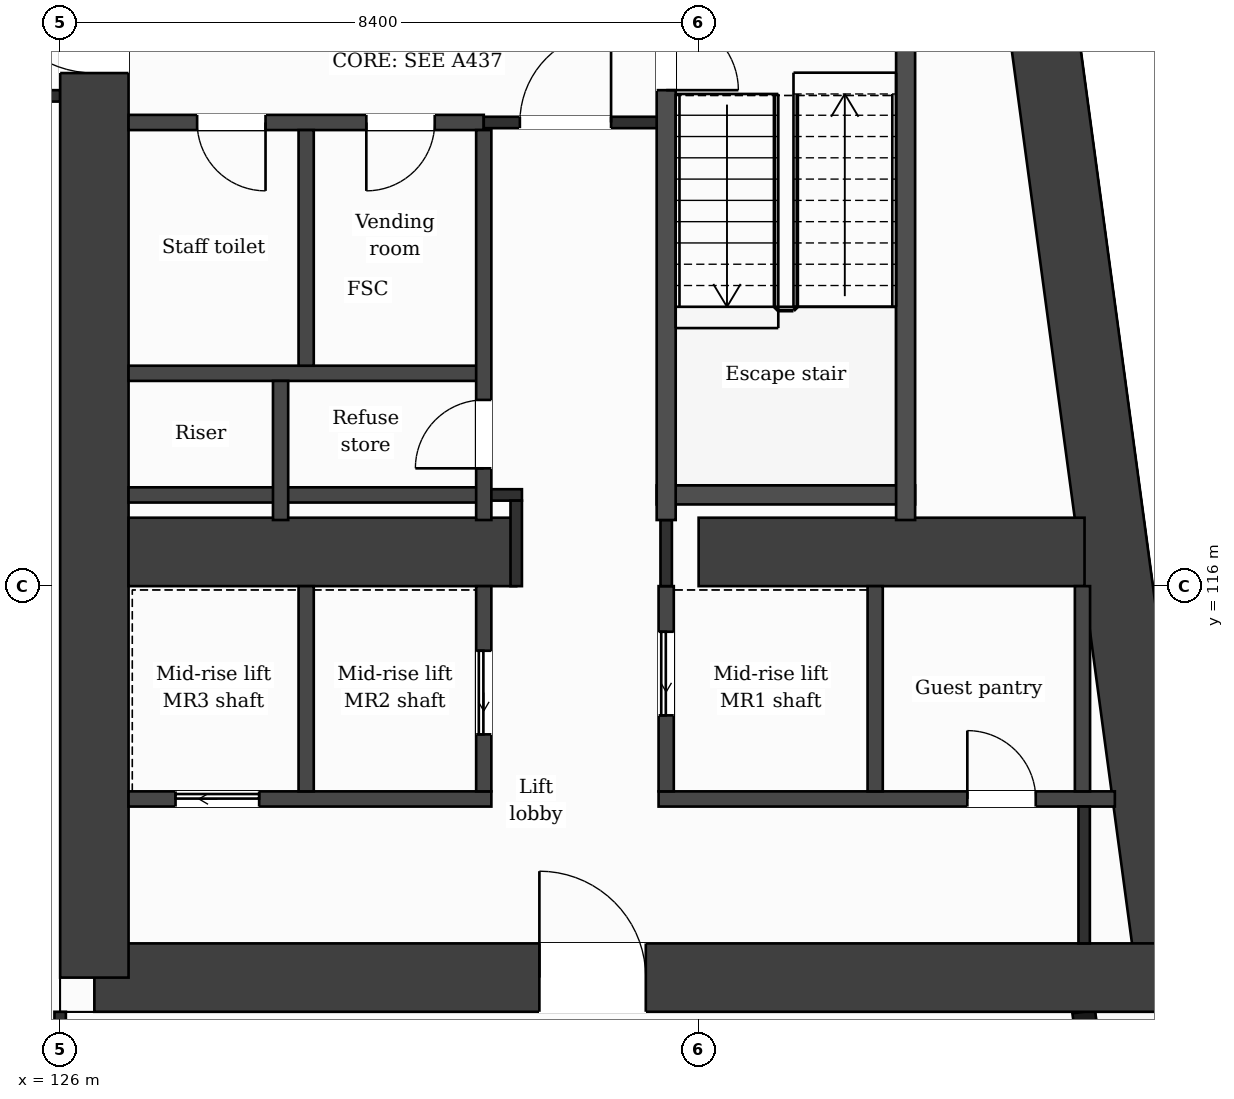
"""IFC4 building model, lengths in metres.
Left out: names, types, materials, properties, quantities, classifications, styles, units other than length and angle.
Written with IfcOpenShell. Run it as: python <this file> out.ifc"""

import sys

from ifc_helpers import new_model, si_unit, direction, frame, frame_2d, origin, place, context, subcontext, project, spatial, rectangle, extrude, element, fill, save


model = new_model("IFC4")
c1 = context("Model", 3, precision=1e-05, world=origin(), true_north=direction((0.0, 1.0)))
c2 = subcontext(c1, "Body", "Model", "MODEL_VIEW")
j1 = project(units=[si_unit("LENGTHUNIT", "METRE"), si_unit("PLANEANGLEUNIT", "RADIAN")], contexts=[c1])
p1 = place(None, origin())
s1 = spatial("IfcSite", under=j1, at=p1, CompositionType="ELEMENT")
p2 = place(p1, origin())
s2 = spatial("IfcBuilding", under=s1, at=p2, CompositionType="ELEMENT")
p3 = place(p2, frame((0.0, 0.0, 155.2)))
s3 = spatial("IfcBuildingStorey", under=s2, at=p3, CompositionType="ELEMENT", Elevation=155.2)
p4 = place(p3, frame((137.776, 131.95, 0.0), z_axis=(0.0, 0.0, 1.0), x_axis=(0.133421759112, -0.991059349482, 0.0)))
e1 = element("IfcWall", 1, at=p4, inside=s3, PredefinedType="SHEAR", context=c2, shape_type="SweptSolid", body=[
    extrude(rectangle(XDim=21.29, YDim=0.9, at=frame_2d((10.645, 0.0))), origin(), (0.0, 0.0, 1.0), 3.7),
])
p5 = place(p3, frame((140.616, 110.85, 0.0), z_axis=(0.0, 0.0, 1.0), x_axis=(-1.0, 0.0, 0.0)))
e2 = element("IfcWall", 2, at=p5, inside=s3, PredefinedType="SHEAR", context=c2, shape_type="SweptSolid", body=[
    extrude(rectangle(XDim=14.166, YDim=0.9, at=frame_2d((7.083, 0.0))), origin(), (0.0, 0.0, 1.0), 3.7),
])
p6 = place(p5, frame((6.911, 0.0, 0.0)))
e3 = element("IfcOpeningElement", 3, at=p6, cuts=e2, PredefinedType="OPENING", context=c2, shape_type="SweptSolid", body=[
    extrude(rectangle(XDim=1.4, YDim=2.1, at=frame_2d((0.7, 1.05))), frame((0.0, 0.46, 0.0), z_axis=(0.0, -1.0, 0.0), x_axis=(1.0, 0.0, 0.0)), (0.0, 0.0, 1.0), 0.92),
])
p7 = place(p3, frame((126.45, 110.85, 0.0), z_axis=(0.0, 0.0, 1.0), x_axis=(0.0, 1.0, 0.0)))
e4 = element("IfcWall", 4, at=p7, inside=s3, PredefinedType="SHEAR", context=c2, shape_type="SweptSolid", body=[
    extrude(rectangle(XDim=21.1, YDim=0.9, at=frame_2d((10.55, 0.0))), origin(), (0.0, 0.0, 1.0), 3.7),
])
p8 = place(p7, frame((11.9, 0.0, 0.0)))
e5 = element("IfcOpeningElement", 5, at=p8, cuts=e4, PredefinedType="OPENING", context=c2, shape_type="SweptSolid", body=[
    extrude(rectangle(XDim=1.4, YDim=2.1, at=frame_2d((0.7, 1.05))), frame((0.0, 0.46, 0.0), z_axis=(0.0, -1.0, 0.0), x_axis=(1.0, 0.0, 0.0)), (0.0, 0.0, 1.0), 0.92),
])
p9 = place(p3, frame((126.9, 116.45, 0.0), z_axis=(0.0, 0.0, 1.0), x_axis=(1.0, 0.0, 0.0)))
e6 = element("IfcWall", 6, at=p9, inside=s3, PredefinedType="SHEAR", context=c2, shape_type="SweptSolid", body=[
    extrude(rectangle(XDim=5.1, YDim=0.9, at=frame_2d((2.55, 0.0))), origin(), (0.0, 0.0, 1.0), 3.7),
])
p10 = place(p3, frame((134.4, 116.45, 0.0), z_axis=(0.0, 0.0, 1.0), x_axis=(1.0, 0.0, 0.0)))
e7 = element("IfcWall", 7, at=p10, inside=s3, PredefinedType="SHEAR", context=c2, shape_type="SweptSolid", body=[
    extrude(rectangle(XDim=5.077, YDim=0.9, at=frame_2d((2.539, 0.0))), origin(), (0.0, 0.0, 1.0), 3.7),
])
p11 = place(p3, frame((140.348, 103.85, 0.0), z_axis=(0.0, 0.0, 1.0), x_axis=(-0.133431549479, 0.991058031401, 0.0)))
e8 = element("IfcWall", 8, at=p11, inside=s3, PredefinedType="SOLIDWALL", context=c2, shape_type="SweptSolid", body=[
    extrude(rectangle(XDim=6.609, YDim=0.3, at=frame_2d((3.304, 0.0))), origin(), (0.0, 0.0, 1.0), 3.38),
])
p12 = place(p11, frame((0.737, 0.0, 0.9)))
e9 = element("IfcOpeningElement", 9, at=p12, cuts=e8, PredefinedType="OPENING", context=c2, shape_type="SweptSolid", body=[
    extrude(rectangle(XDim=1.2, YDim=2.1, at=frame_2d((0.6, 1.05))), frame((0.0, 0.16, 0.0), z_axis=(0.0, -1.0, 0.0), x_axis=(1.0, 0.0, 0.0)), (0.0, 0.0, 1.0), 0.32),
])
p13 = place(p11, frame((3.991, 0.0, 0.0)))
e10 = element("IfcOpeningElement", 10, at=p13, cuts=e8, PredefinedType="OPENING", context=c2, shape_type="SweptSolid", body=[
    extrude(rectangle(XDim=1.2, YDim=2.4, at=frame_2d((0.6, 1.2))), frame((0.0, 0.16, 0.0), z_axis=(0.0, -1.0, 0.0), x_axis=(1.0, 0.0, 0.0)), (0.0, 0.0, 1.0), 0.32),
])
p14 = place(p3, frame((126.9, 113.2, 0.0), z_axis=(0.0, 0.0, 1.0), x_axis=(1.0, 0.0, 0.0)))
e11 = element("IfcWall", 11, at=p14, inside=s3, PredefinedType="PARTITIONING", context=c2, shape_type="SweptSolid", body=[
    extrude(rectangle(XDim=4.773, YDim=0.2, at=frame_2d((2.387, 0.0))), origin(), (0.0, 0.0, 1.0), 3.38),
])
p15 = place(p14, frame((0.618, 0.0, 0.0)))
e12 = element("IfcOpeningElement", 12, at=p15, cuts=e11, PredefinedType="OPENING", context=c2, shape_type="SweptSolid", body=[
    extrude(rectangle(XDim=1.1, YDim=2.1, at=frame_2d((0.55, 1.05))), frame((0.0, 0.11, 0.0), z_axis=(0.0, -1.0, 0.0), x_axis=(1.0, 0.0, 0.0)), (0.0, 0.0, 1.0), 0.22),
])
p16 = place(p3, frame((133.873, 113.2, 0.0), z_axis=(0.0, 0.0, 1.0), x_axis=(1.0, 0.0, 0.0)))
e13 = element("IfcWall", 13, at=p16, inside=s3, PredefinedType="PARTITIONING", context=c2, shape_type="SweptSolid", body=[
    extrude(rectangle(XDim=6.003, YDim=0.2, at=frame_2d((3.001, 0.0))), origin(), (0.0, 0.0, 1.0), 3.38),
])
p17 = place(p16, frame((4.062, 0.0, 0.0)))
e14 = element("IfcOpeningElement", 14, at=p17, cuts=e13, PredefinedType="OPENING", context=c2, shape_type="SweptSolid", body=[
    extrude(rectangle(XDim=0.9, YDim=2.1, at=frame_2d((0.45, 1.05))), frame((0.0, 0.11, 0.0), z_axis=(0.0, -1.0, 0.0), x_axis=(1.0, 0.0, 0.0)), (0.0, 0.0, 1.0), 0.22),
])
p18 = place(p3, frame((126.9, 117.2, 0.0), z_axis=(0.0, 0.0, 1.0), x_axis=(1.0, 0.0, 0.0)))
e15 = element("IfcWall", 15, at=p18, inside=s3, PredefinedType="PARTITIONING", context=c2, shape_type="SweptSolid", body=[
    extrude(rectangle(XDim=4.673, YDim=0.2, at=frame_2d((2.336, 0.0))), origin(), (0.0, 0.0, 1.0), 3.38),
])
p19 = place(p3, frame((131.573, 117.2, 0.0), z_axis=(0.0, 0.0, 1.0), x_axis=(1.0, 0.0, 0.0)))
e16 = element("IfcWall", 16, at=p19, inside=s3, PredefinedType="PARTITIONING", context=c2, shape_type="SweptSolid", body=[
    extrude(rectangle(XDim=0.502, YDim=0.15, at=frame_2d((0.251, 0.0))), origin(), (0.0, 0.0, 1.0), 3.38),
])
p20 = place(p3, frame((133.848, 117.2, 0.0), z_axis=(0.0, 0.0, 1.0), x_axis=(1.0, 0.0, 0.0)))
e17 = element("IfcWall", 17, at=p20, inside=s3, PredefinedType="PARTITIONING", context=c2, shape_type="SweptSolid", body=[
    extrude(rectangle(XDim=3.4, YDim=0.25, at=frame_2d((1.7, 0.0))), origin(), (0.0, 0.0, 1.0), 3.38),
])
p21 = place(p3, frame((126.9, 118.8, 0.0), z_axis=(0.0, 0.0, 1.0), x_axis=(1.0, 0.0, 0.0)))
e18 = element("IfcWall", 18, at=p21, inside=s3, PredefinedType="PARTITIONING", context=c2, shape_type="SweptSolid", body=[
    extrude(rectangle(XDim=4.673, YDim=0.2, at=frame_2d((2.336, 0.0))), origin(), (0.0, 0.0, 1.0), 3.38),
])
p22 = place(p3, frame((126.9, 122.1, 0.0), z_axis=(0.0, 0.0, 1.0), x_axis=(1.0, 0.0, 0.0)))
e19 = element("IfcWall", 19, at=p22, inside=s3, PredefinedType="PARTITIONING", context=c2, shape_type="SweptSolid", body=[
    extrude(rectangle(XDim=4.673, YDim=0.2, at=frame_2d((2.336, 0.0))), origin(), (0.0, 0.0, 1.0), 3.38),
])
p23 = place(p22, frame((3.128, 0.0, 0.0)))
e20 = element("IfcOpeningElement", 20, at=p23, cuts=e19, PredefinedType="OPENING", context=c2, shape_type="SweptSolid", body=[
    extrude(rectangle(XDim=0.9, YDim=2.1, at=frame_2d((0.45, 1.05))), frame((0.0, 0.11, 0.0), z_axis=(0.0, -1.0, 0.0), x_axis=(1.0, 0.0, 0.0)), (0.0, 0.0, 1.0), 0.22),
])
p24 = place(p22, frame((0.902, 0.0, 0.0)))
e21 = element("IfcOpeningElement", 21, at=p24, cuts=e19, PredefinedType="OPENING", context=c2, shape_type="SweptSolid", body=[
    extrude(rectangle(XDim=0.9, YDim=2.1, at=frame_2d((0.45, 1.05))), frame((0.0, 0.11, 0.0), z_axis=(0.0, -1.0, 0.0), x_axis=(1.0, 0.0, 0.0)), (0.0, 0.0, 1.0), 0.22),
])
p25 = place(p3, frame((131.573, 122.1, 0.0), z_axis=(0.0, 0.0, 1.0), x_axis=(1.0, 0.0, 0.0)))
e22 = element("IfcWall", 22, at=p25, inside=s3, PredefinedType="PARTITIONING", context=c2, shape_type="SweptSolid", body=[
    extrude(rectangle(XDim=2.4, YDim=0.15, at=frame_2d((1.2, 0.0))), origin(), (0.0, 0.0, 1.0), 3.38),
])
p26 = place(p25, frame((0.475, 0.0, 0.0)))
e23 = element("IfcOpeningElement", 23, at=p26, cuts=e22, PredefinedType="OPENING", context=c2, shape_type="SweptSolid", body=[
    extrude(rectangle(XDim=1.2, YDim=2.1, at=frame_2d((0.6, 1.05))), frame((0.0, 0.085, 0.0), z_axis=(0.0, -1.0, 0.0), x_axis=(1.0, 0.0, 0.0)), (0.0, 0.0, 1.0), 0.17),
])
p27 = place(p3, frame((100.8, 122.45, 0.0), z_axis=(0.0, 0.0, 1.0), x_axis=(1.0, 0.0, 0.0)))
e24 = element("IfcWall", 24, at=p27, inside=s3, PredefinedType="PARTITIONING", context=c2, shape_type="SweptSolid", body=[
    extrude(rectangle(XDim=25.2, YDim=0.15, at=frame_2d((12.6, 0.0))), origin(), (0.0, 0.0, 1.0), 3.38),
])
p28 = place(p3, frame((126.0, 109.075, 0.0), z_axis=(0.0, 0.0, 1.0), x_axis=(0.0, 1.0, 0.0)))
e25 = element("IfcWall", 25, at=p28, inside=s3, PredefinedType="PARTITIONING", context=c2, shape_type="SweptSolid", body=[
    extrude(rectangle(XDim=1.325, YDim=0.15, at=frame_2d((0.663, 0.0))), origin(), (0.0, 0.0, 1.0), 3.38),
])
p29 = place(p3, frame((128.9, 116.87, 0.0), z_axis=(0.0, 0.0, 1.0), x_axis=(0.0, 1.0, 0.0)))
e26 = element("IfcWall", 26, at=p29, inside=s3, PredefinedType="PARTITIONING", context=c2, shape_type="SweptSolid", body=[
    extrude(rectangle(XDim=1.83, YDim=0.2, at=frame_2d((0.915, 0.0))), origin(), (0.0, 0.0, 1.0), 3.38),
])
p30 = place(p3, frame((129.237, 113.3, 0.0), z_axis=(0.0, 0.0, 1.0), x_axis=(0.0, 1.0, 0.0)))
e27 = element("IfcWall", 27, at=p30, inside=s3, PredefinedType="PARTITIONING", context=c2, shape_type="SweptSolid", body=[
    extrude(rectangle(XDim=2.7, YDim=0.2, at=frame_2d((1.35, 0.0))), origin(), (0.0, 0.0, 1.0), 3.38),
])
p31 = place(p3, frame((129.237, 118.9, 0.0), z_axis=(0.0, 0.0, 1.0), x_axis=(0.0, 1.0, 0.0)))
e28 = element("IfcWall", 28, at=p31, inside=s3, PredefinedType="PARTITIONING", context=c2, shape_type="SweptSolid", body=[
    extrude(rectangle(XDim=3.1, YDim=0.2, at=frame_2d((1.55, 0.0))), origin(), (0.0, 0.0, 1.0), 3.38),
])
p32 = place(p3, frame((131.573, 113.3, 0.0), z_axis=(0.0, 0.0, 1.0), x_axis=(0.0, 1.0, 0.0)))
e29 = element("IfcWall", 29, at=p32, inside=s3, PredefinedType="PARTITIONING", context=c2, shape_type="SweptSolid", body=[
    extrude(rectangle(XDim=2.7, YDim=0.2, at=frame_2d((1.35, 0.0))), origin(), (0.0, 0.0, 1.0), 3.38),
])
p33 = place(p32, frame((0.75, 0.0, 0.0)))
e30 = element("IfcOpeningElement", 30, at=p33, cuts=e29, PredefinedType="OPENING", context=c2, shape_type="SweptSolid", body=[
    extrude(rectangle(XDim=1.1, YDim=2.1, at=frame_2d((0.55, 1.05))), frame((0.0, 0.11, 0.0), z_axis=(0.0, -1.0, 0.0), x_axis=(1.0, 0.0, 0.0)), (0.0, 0.0, 1.0), 0.22),
])
p34 = place(p3, frame((131.573, 116.87, 0.0), z_axis=(0.0, 0.0, 1.0), x_axis=(0.0, 1.0, 0.0)))
e31 = element("IfcWall", 31, at=p34, inside=s3, PredefinedType="PARTITIONING", context=c2, shape_type="SweptSolid", body=[
    extrude(rectangle(XDim=5.13, YDim=0.2, at=frame_2d((2.565, 0.0))), origin(), (0.0, 0.0, 1.0), 3.38),
])
p35 = place(p34, frame((0.68, 0.0, 0.0)))
e32 = element("IfcOpeningElement", 32, at=p35, cuts=e31, PredefinedType="OPENING", context=c2, shape_type="SweptSolid", body=[
    extrude(rectangle(XDim=0.9, YDim=2.1, at=frame_2d((0.45, 1.05))), frame((0.0, 0.11, 0.0), z_axis=(0.0, -1.0, 0.0), x_axis=(1.0, 0.0, 0.0)), (0.0, 0.0, 1.0), 0.22),
])
p36 = place(p3, frame((132.0, 116.0, 0.0), z_axis=(0.0, 0.0, 1.0), x_axis=(0.0, 1.0, 0.0)))
e33 = element("IfcWall", 33, at=p36, inside=s3, PredefinedType="PARTITIONING", context=c2, shape_type="SweptSolid", body=[
    extrude(rectangle(XDim=1.125, YDim=0.15, at=frame_2d((0.562, 0.0))), origin(), (0.0, 0.0, 1.0), 3.38),
])
p37 = place(p3, frame((133.973, 113.3, 0.0), z_axis=(0.0, 0.0, 1.0), x_axis=(0.0, 1.0, 0.0)))
e34 = element("IfcWall", 34, at=p37, inside=s3, PredefinedType="PARTITIONING", context=c2, shape_type="SweptSolid", body=[
    extrude(rectangle(XDim=2.7, YDim=0.2, at=frame_2d((1.35, 0.0))), origin(), (0.0, 0.0, 1.0), 3.38),
])
p38 = place(p37, frame((1.0, 0.0, 0.0)))
e35 = element("IfcOpeningElement", 35, at=p38, cuts=e34, PredefinedType="OPENING", context=c2, shape_type="SweptSolid", body=[
    extrude(rectangle(XDim=1.1, YDim=2.1, at=frame_2d((0.55, 1.05))), frame((0.0, 0.11, 0.0), z_axis=(0.0, -1.0, 0.0), x_axis=(1.0, 0.0, 0.0)), (0.0, 0.0, 1.0), 0.22),
])
p39 = place(p3, frame((133.973, 116.0, 0.0), z_axis=(0.0, 0.0, 1.0), x_axis=(0.0, 1.0, 0.0)))
e36 = element("IfcWall", 36, at=p39, inside=s3, PredefinedType="PARTITIONING", context=c2, shape_type="SweptSolid", body=[
    extrude(rectangle(XDim=0.87, YDim=0.15, at=frame_2d((0.435, 0.0))), origin(), (0.0, 0.0, 1.0), 3.38),
])
p40 = place(p3, frame((133.973, 116.87, 0.0), z_axis=(0.0, 0.0, 1.0), x_axis=(0.0, 1.0, 0.0)))
e37 = element("IfcWall", 37, at=p40, inside=s3, PredefinedType="PARTITIONING", context=c2, shape_type="SweptSolid", body=[
    extrude(rectangle(XDim=6.955, YDim=0.25, at=frame_2d((3.478, 0.0))), origin(), (0.0, 0.0, 1.0), 3.38),
])
p41 = place(p40, frame((5.655, 0.0, 0.0)))
e38 = element("IfcOpeningElement", 38, at=p41, cuts=e37, PredefinedType="OPENING", context=c2, shape_type="SweptSolid", body=[
    extrude(rectangle(XDim=0.95, YDim=2.1, at=frame_2d((0.475, 1.05))), frame((0.0, 0.135, 0.0), z_axis=(0.0, -1.0, 0.0), x_axis=(1.0, 0.0, 0.0)), (0.0, 0.0, 1.0), 0.27),
])
p42 = place(p3, frame((136.722, 113.3, 0.0), z_axis=(0.0, 0.0, 1.0), x_axis=(0.0, 1.0, 0.0)))
e39 = element("IfcWall", 39, at=p42, inside=s3, PredefinedType="PARTITIONING", context=c2, shape_type="SweptSolid", body=[
    extrude(rectangle(XDim=2.7, YDim=0.2, at=frame_2d((1.35, 0.0))), origin(), (0.0, 0.0, 1.0), 3.38),
])
p43 = place(p3, frame((137.123, 116.87, 0.0), z_axis=(0.0, 0.0, 1.0), x_axis=(0.0, 1.0, 0.0)))
e40 = element("IfcWall", 40, at=p43, inside=s3, PredefinedType="PARTITIONING", context=c2, shape_type="SweptSolid", body=[
    extrude(rectangle(XDim=6.955, YDim=0.25, at=frame_2d((3.478, 0.0))), origin(), (0.0, 0.0, 1.0), 3.38),
])
p44 = place(p3, frame((139.45, 113.3, 0.0), z_axis=(0.0, 0.0, 1.0), x_axis=(0.0, 1.0, 0.0)))
e41 = element("IfcWall", 41, at=p44, inside=s3, PredefinedType="PARTITIONING", context=c2, shape_type="SweptSolid", body=[
    extrude(rectangle(XDim=2.7, YDim=0.2, at=frame_2d((1.35, 0.0))), origin(), (0.0, 0.0, 1.0), 3.38),
])
p45 = place(p3, frame((139.472, 111.3, 0.0), z_axis=(0.0, 0.0, 1.0), x_axis=(0.0, 1.0, 0.0)))
e42 = element("IfcWall", 42, at=p45, inside=s3, PredefinedType="PARTITIONING", context=c2, shape_type="SweptSolid", body=[
    extrude(rectangle(XDim=1.8, YDim=0.15, at=frame_2d((0.9, 0.0))), origin(), (0.0, 0.0, 1.0), 3.38),
])
p46 = place(p26, origin())
e43 = element("IfcDoor", 43, at=p46, inside=s3, OperationType="SINGLE_SWING_RIGHT", PredefinedType="DOOR", context=c2, shape_type="SweptSolid", body=[
    extrude(rectangle(XDim=1.2, YDim=2.1, at=frame_2d((0.6, 1.05))), frame((0.0, 0.025, 0.0), z_axis=(0.0, -1.0, 0.0), x_axis=(1.0, 0.0, 0.0)), (0.0, 0.0, 1.0), 0.05),
])
fill(e23, e43)
p47 = place(p23, origin())
e44 = element("IfcDoor", 44, at=p47, inside=s3, OperationType="SINGLE_SWING_LEFT", PredefinedType="DOOR", context=c2, shape_type="SweptSolid", body=[
    extrude(rectangle(XDim=0.9, YDim=2.1, at=frame_2d((0.45, 1.05))), frame((0.0, 0.025, 0.0), z_axis=(0.0, -1.0, 0.0), x_axis=(1.0, 0.0, 0.0)), (0.0, 0.0, 1.0), 0.05),
])
fill(e20, e44)
p48 = place(p24, origin())
e45 = element("IfcDoor", 45, at=p48, inside=s3, OperationType="SINGLE_SWING_RIGHT", PredefinedType="DOOR", context=c2, shape_type="SweptSolid", body=[
    extrude(rectangle(XDim=0.9, YDim=2.1, at=frame_2d((0.45, 1.05))), frame((0.0, 0.025, 0.0), z_axis=(0.0, -1.0, 0.0), x_axis=(1.0, 0.0, 0.0)), (0.0, 0.0, 1.0), 0.05),
])
fill(e21, e45)
p49 = place(p41, origin())
e46 = element("IfcDoor", 46, at=p49, inside=s3, OperationType="SINGLE_SWING_LEFT", PredefinedType="DOOR", context=c2, shape_type="SweptSolid", body=[
    extrude(rectangle(XDim=0.95, YDim=2.1, at=frame_2d((0.475, 1.05))), frame((0.0, 0.025, 0.0), z_axis=(0.0, -1.0, 0.0), x_axis=(1.0, 0.0, 0.0)), (0.0, 0.0, 1.0), 0.05),
])
fill(e38, e46)
p50 = place(p35, origin())
e47 = element("IfcDoor", 47, at=p50, inside=s3, OperationType="SINGLE_SWING_LEFT", PredefinedType="DOOR", context=c2, shape_type="SweptSolid", body=[
    extrude(rectangle(XDim=0.9, YDim=2.1, at=frame_2d((0.45, 1.05))), frame((0.0, 0.025, 0.0), z_axis=(0.0, -1.0, 0.0), x_axis=(1.0, 0.0, 0.0)), (0.0, 0.0, 1.0), 0.05),
])
fill(e32, e47)
p51 = place(p38, origin())
e48 = element("IfcDoor", 48, at=p51, inside=s3, OperationType="SLIDING_TO_LEFT", PredefinedType="DOOR", context=c2, shape_type="SweptSolid", body=[
    extrude(rectangle(XDim=1.1, YDim=2.1, at=frame_2d((0.55, 1.05))), frame((0.0, 0.025, 0.0), z_axis=(0.0, -1.0, 0.0), x_axis=(1.0, 0.0, 0.0)), (0.0, 0.0, 1.0), 0.05),
])
fill(e35, e48)
p52 = place(p33, origin())
e49 = element("IfcDoor", 49, at=p52, inside=s3, OperationType="SLIDING_TO_LEFT", PredefinedType="DOOR", context=c2, shape_type="SweptSolid", body=[
    extrude(rectangle(XDim=1.1, YDim=2.1, at=frame_2d((0.55, 1.05))), frame((0.0, 0.025, 0.0), z_axis=(0.0, -1.0, 0.0), x_axis=(1.0, 0.0, 0.0)), (0.0, 0.0, 1.0), 0.05),
])
fill(e30, e49)
p53 = place(p15, origin())
e50 = element("IfcDoor", 50, at=p53, inside=s3, OperationType="SLIDING_TO_LEFT", PredefinedType="DOOR", context=c2, shape_type="SweptSolid", body=[
    extrude(rectangle(XDim=1.1, YDim=2.1, at=frame_2d((0.55, 1.05))), frame((0.0, 0.025, 0.0), z_axis=(0.0, -1.0, 0.0), x_axis=(1.0, 0.0, 0.0)), (0.0, 0.0, 1.0), 0.05),
])
fill(e12, e50)
p54 = place(p17, origin())
e51 = element("IfcDoor", 51, at=p54, inside=s3, OperationType="SINGLE_SWING_LEFT", PredefinedType="DOOR", context=c2, shape_type="SweptSolid", body=[
    extrude(rectangle(XDim=0.9, YDim=2.1, at=frame_2d((0.45, 1.05))), frame((0.0, 0.025, 0.0), z_axis=(0.0, -1.0, 0.0), x_axis=(1.0, 0.0, 0.0)), (0.0, 0.0, 1.0), 0.05),
])
fill(e14, e51)
p55 = place(p6, origin())
e52 = element("IfcDoor", 52, at=p55, inside=s3, OperationType="SINGLE_SWING_RIGHT", PredefinedType="DOOR", context=c2, shape_type="SweptSolid", body=[
    extrude(rectangle(XDim=1.4, YDim=2.1, at=frame_2d((0.7, 1.05))), frame((0.0, 0.025, 0.0), z_axis=(0.0, -1.0, 0.0), x_axis=(1.0, 0.0, 0.0)), (0.0, 0.0, 1.0), 0.05),
])
fill(e3, e52)
p56 = place(p8, origin())
e53 = element("IfcDoor", 53, at=p56, inside=s3, OperationType="SINGLE_SWING_RIGHT", PredefinedType="DOOR", context=c2, shape_type="SweptSolid", body=[
    extrude(rectangle(XDim=1.4, YDim=2.1, at=frame_2d((0.7, 1.05))), frame((0.0, 0.025, 0.0), z_axis=(0.0, -1.0, 0.0), x_axis=(1.0, 0.0, 0.0)), (0.0, 0.0, 1.0), 0.05),
])
fill(e5, e53)
save(model, sys.argv[1])
